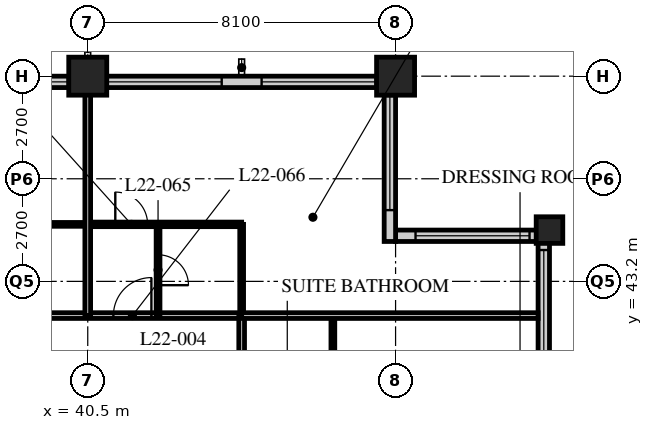
"""IFC4 building model, lengths in metres.
Left out: names, types, materials, properties, quantities, classifications, styles, units other than length and angle.
Written with IfcOpenShell. Run it as: python <this file> out.ifc"""

import sys

from ifc_helpers import new_model, si_unit, direction, frame, frame_2d, origin, origin_2d, place, context, subcontext, project, spatial, rectangle, hollow_rectangle, extrude, element, fill, save


model = new_model("IFC4")
c1 = context("Model", 3, precision=1e-05, world=origin(), true_north=direction((0.0, 1.0)))
c2 = subcontext(c1, "Body", "Model", "MODEL_VIEW")
j1 = project(units=[si_unit("LENGTHUNIT", "METRE"), si_unit("PLANEANGLEUNIT", "RADIAN")], contexts=[c1])
p1 = place(None, origin())
s1 = spatial("IfcSite", under=j1, at=p1, CompositionType="ELEMENT")
p2 = place(p1, origin())
s2 = spatial("IfcBuilding", under=s1, at=p2, CompositionType="ELEMENT")
p3 = place(p2, frame((0.0, 0.0, 87.4)))
s3 = spatial("IfcBuildingStorey", under=s2, at=p3, CompositionType="ELEMENT", Elevation=87.4)
for number, where, z_axis, x_axis in (
    (1, (40.5, 48.6, 0.0), (0.0, 0.0, 1.0), (1.0, 0.0, 0.0)),
    (2, (48.6, 48.6, 0.0), (0.0, 0.0, 1.0), (1.0, 0.0, 0.0)),
):
    element("IfcColumn", number, at=place(p3, frame(where, z_axis=z_axis, x_axis=x_axis)), inside=s3, PredefinedType="COLUMN", context=c2, shape_type="SweptSolid", body=[
        extrude(hollow_rectangle(XDim=1.0, YDim=1.0, WallThickness=0.1, at=origin_2d()), origin(), (0.0, 0.0, 1.0), 3.4),
    ])
p4 = place(p3, frame((52.65, 44.55, 0.0), z_axis=(0.0, 0.0, 1.0), x_axis=(1.0, 0.0, 0.0)))
e3 = element("IfcColumn", 3, at=p4, inside=s3, PredefinedType="COLUMN", context=c2, shape_type="SweptSolid", body=[
    extrude(hollow_rectangle(XDim=0.7, YDim=0.7, WallThickness=0.07, at=origin_2d()), origin(), (0.0, 0.0, 1.0), 3.4),
])
p5 = place(p3, frame((52.5, 40.2, 0.0), z_axis=(0.0, 0.0, 1.0), x_axis=(0.0, 1.0, 0.0)))
e4 = element("IfcWall", 4, at=p5, inside=s3, PredefinedType="SOLIDWALL", context=c2, shape_type="SweptSolid", body=[
    extrude(rectangle(XDim=4.35, YDim=0.3, at=frame_2d((2.175, 0.0))), origin(), (0.0, 0.0, 1.0), 2.45),
])
p6 = place(p5, frame((0.825, 0.0, 0.9)))
e5 = element("IfcOpeningElement", 5, at=p6, cuts=e4, PredefinedType="OPENING", context=c2, shape_type="SweptSolid", body=[
    extrude(rectangle(XDim=3.0, YDim=1.1, at=frame_2d((1.5, 0.55))), frame((0.0, 0.16, 0.0), z_axis=(0.0, -1.0, 0.0), x_axis=(1.0, 0.0, 0.0)), (0.0, 0.0, 1.0), 0.32),
])
p7 = place(p3, frame((52.35, 44.4, 0.0), z_axis=(0.0, 0.0, 1.0), x_axis=(-1.0, 0.0, 0.0)))
e6 = element("IfcWall", 6, at=p7, inside=s3, PredefinedType="SOLIDWALL", context=c2, shape_type="SweptSolid", body=[
    extrude(rectangle(XDim=3.75, YDim=0.3, at=frame_2d((1.875, 0.0))), origin(), (0.0, 0.0, 1.0), 2.45),
])
p8 = place(p7, frame((0.225, 0.0, 0.9)))
e7 = element("IfcOpeningElement", 7, at=p8, cuts=e6, PredefinedType="OPENING", context=c2, shape_type="SweptSolid", body=[
    extrude(rectangle(XDim=3.0, YDim=1.1, at=frame_2d((1.5, 0.55))), frame((0.0, 0.16, 0.0), z_axis=(0.0, -1.0, 0.0), x_axis=(1.0, 0.0, 0.0)), (0.0, 0.0, 1.0), 0.32),
])
p9 = place(p3, frame((48.45, 44.25, 0.0), z_axis=(0.0, 0.0, 1.0), x_axis=(0.0, 1.0, 0.0)))
e8 = element("IfcWall", 8, at=p9, inside=s3, PredefinedType="SOLIDWALL", context=c2, shape_type="SweptSolid", body=[
    extrude(rectangle(XDim=4.35, YDim=0.3, at=frame_2d((2.175, 0.0))), origin(), (0.0, 0.0, 1.0), 2.05),
])
p10 = place(p9, frame((0.825, 0.0, 0.9)))
e9 = element("IfcOpeningElement", 9, at=p10, cuts=e8, PredefinedType="OPENING", context=c2, shape_type="SweptSolid", body=[
    extrude(rectangle(XDim=3.0, YDim=1.1, at=frame_2d((1.5, 0.55))), frame((0.0, 0.16, 0.0), z_axis=(0.0, -1.0, 0.0), x_axis=(1.0, 0.0, 0.0)), (0.0, 0.0, 1.0), 0.32),
])
p11 = place(p3, frame((48.3, 48.45, 0.0), z_axis=(0.0, 0.0, 1.0), x_axis=(-1.0, 0.0, 0.0)))
e10 = element("IfcWall", 10, at=p11, inside=s3, PredefinedType="SOLIDWALL", context=c2, shape_type="SweptSolid", body=[
    extrude(rectangle(XDim=40.2, YDim=0.3, at=frame_2d((20.1, 0.0))), origin(), (0.0, 0.0, 1.0), 2.05),
])
p12 = place(p11, frame((0.225, 0.0, 0.9)))
e11 = element("IfcOpeningElement", 11, at=p12, cuts=e10, PredefinedType="OPENING", context=c2, shape_type="SweptSolid", body=[
    extrude(rectangle(XDim=3.0, YDim=1.1, at=frame_2d((1.5, 0.55))), frame((0.0, 0.16, 0.0), z_axis=(0.0, -1.0, 0.0), x_axis=(1.0, 0.0, 0.0)), (0.0, 0.0, 1.0), 0.32),
])
p13 = place(p11, frame((4.275, 0.0, 0.9)))
e12 = element("IfcOpeningElement", 12, at=p13, cuts=e10, PredefinedType="OPENING", context=c2, shape_type="SweptSolid", body=[
    extrude(rectangle(XDim=3.0, YDim=1.1, at=frame_2d((1.5, 0.55))), frame((0.0, 0.16, 0.0), z_axis=(0.0, -1.0, 0.0), x_axis=(1.0, 0.0, 0.0)), (0.0, 0.0, 1.0), 0.32),
])
p14 = place(p11, frame((8.325, 0.0, 0.9)))
e13 = element("IfcOpeningElement", 13, at=p14, cuts=e10, PredefinedType="OPENING", context=c2, shape_type="SweptSolid", body=[
    extrude(rectangle(XDim=3.0, YDim=1.1, at=frame_2d((1.5, 0.55))), frame((0.0, 0.16, 0.0), z_axis=(0.0, -1.0, 0.0), x_axis=(1.0, 0.0, 0.0)), (0.0, 0.0, 1.0), 0.32),
])
p15 = place(p11, frame((12.375, 0.0, 0.9)))
e14 = element("IfcOpeningElement", 14, at=p15, cuts=e10, PredefinedType="OPENING", context=c2, shape_type="SweptSolid", body=[
    extrude(rectangle(XDim=3.0, YDim=1.1, at=frame_2d((1.5, 0.55))), frame((0.0, 0.16, 0.0), z_axis=(0.0, -1.0, 0.0), x_axis=(1.0, 0.0, 0.0)), (0.0, 0.0, 1.0), 0.32),
])
p16 = place(p11, frame((16.425, 0.0, 0.9)))
e15 = element("IfcOpeningElement", 15, at=p16, cuts=e10, PredefinedType="OPENING", context=c2, shape_type="SweptSolid", body=[
    extrude(rectangle(XDim=3.0, YDim=1.1, at=frame_2d((1.5, 0.55))), frame((0.0, 0.16, 0.0), z_axis=(0.0, -1.0, 0.0), x_axis=(1.0, 0.0, 0.0)), (0.0, 0.0, 1.0), 0.32),
])
p17 = place(p11, frame((20.475, 0.0, 0.9)))
e16 = element("IfcOpeningElement", 16, at=p17, cuts=e10, PredefinedType="OPENING", context=c2, shape_type="SweptSolid", body=[
    extrude(rectangle(XDim=3.0, YDim=1.1, at=frame_2d((1.5, 0.55))), frame((0.0, 0.16, 0.0), z_axis=(0.0, -1.0, 0.0), x_axis=(1.0, 0.0, 0.0)), (0.0, 0.0, 1.0), 0.32),
])
p18 = place(p11, frame((24.525, 0.0, 0.9)))
e17 = element("IfcOpeningElement", 17, at=p18, cuts=e10, PredefinedType="OPENING", context=c2, shape_type="SweptSolid", body=[
    extrude(rectangle(XDim=3.0, YDim=1.1, at=frame_2d((1.5, 0.55))), frame((0.0, 0.16, 0.0), z_axis=(0.0, -1.0, 0.0), x_axis=(1.0, 0.0, 0.0)), (0.0, 0.0, 1.0), 0.32),
])
p19 = place(p11, frame((28.575, 0.0, 0.9)))
e18 = element("IfcOpeningElement", 18, at=p19, cuts=e10, PredefinedType="OPENING", context=c2, shape_type="SweptSolid", body=[
    extrude(rectangle(XDim=3.0, YDim=1.1, at=frame_2d((1.5, 0.55))), frame((0.0, 0.16, 0.0), z_axis=(0.0, -1.0, 0.0), x_axis=(1.0, 0.0, 0.0)), (0.0, 0.0, 1.0), 0.32),
])
p20 = place(p11, frame((32.625, 0.0, 0.9)))
e19 = element("IfcOpeningElement", 19, at=p20, cuts=e10, PredefinedType="OPENING", context=c2, shape_type="SweptSolid", body=[
    extrude(rectangle(XDim=3.0, YDim=1.1, at=frame_2d((1.5, 0.55))), frame((0.0, 0.16, 0.0), z_axis=(0.0, -1.0, 0.0), x_axis=(1.0, 0.0, 0.0)), (0.0, 0.0, 1.0), 0.32),
])
p21 = place(p11, frame((36.675, 0.0, 0.9)))
e20 = element("IfcOpeningElement", 20, at=p21, cuts=e10, PredefinedType="OPENING", context=c2, shape_type="SweptSolid", body=[
    extrude(rectangle(XDim=3.0, YDim=1.1, at=frame_2d((1.5, 0.55))), frame((0.0, 0.16, 0.0), z_axis=(0.0, -1.0, 0.0), x_axis=(1.0, 0.0, 0.0)), (0.0, 0.0, 1.0), 0.32),
])
p22 = place(p3, frame((12.15, 42.3, 0.0), z_axis=(0.0, 0.0, 1.0), x_axis=(1.0, 0.0, 0.0)))
e21 = element("IfcWall", 21, at=p22, inside=s3, PredefinedType="PARTITIONING", context=c2, shape_type="SweptSolid", body=[
    extrude(rectangle(XDim=32.4, YDim=0.15, at=frame_2d((16.2, 0.0))), origin(), (0.0, 0.0, 1.0), 3.15),
])
p23 = place(p22, frame((5.95, 0.0, 0.0)))
e22 = element("IfcOpeningElement", 22, at=p23, cuts=e21, PredefinedType="OPENING", context=c2, shape_type="SweptSolid", body=[
    extrude(rectangle(XDim=1.0, YDim=2.1, at=frame_2d((0.5, 1.05))), frame((0.0, 0.085, 0.0), z_axis=(0.0, -1.0, 0.0), x_axis=(1.0, 0.0, 0.0)), (0.0, 0.0, 1.0), 0.17),
])
p24 = place(p22, frame((14.6, 0.0, 0.0)))
e23 = element("IfcOpeningElement", 23, at=p24, cuts=e21, PredefinedType="OPENING", context=c2, shape_type="SweptSolid", body=[
    extrude(rectangle(XDim=1.0, YDim=2.1, at=frame_2d((0.5, 1.05))), frame((0.0, 0.085, 0.0), z_axis=(0.0, -1.0, 0.0), x_axis=(1.0, 0.0, 0.0)), (0.0, 0.0, 1.0), 0.17),
])
p25 = place(p22, frame((18.65, 0.0, 0.0)))
e24 = element("IfcOpeningElement", 24, at=p25, cuts=e21, PredefinedType="OPENING", context=c2, shape_type="SweptSolid", body=[
    extrude(rectangle(XDim=1.0, YDim=2.1, at=frame_2d((0.5, 1.05))), frame((0.0, 0.085, 0.0), z_axis=(0.0, -1.0, 0.0), x_axis=(1.0, 0.0, 0.0)), (0.0, 0.0, 1.0), 0.17),
])
p26 = place(p22, frame((22.15, 0.0, 0.0)))
e25 = element("IfcOpeningElement", 25, at=p26, cuts=e21, PredefinedType="OPENING", context=c2, shape_type="SweptSolid", body=[
    extrude(rectangle(XDim=1.0, YDim=2.1, at=frame_2d((0.5, 1.05))), frame((0.0, 0.085, 0.0), z_axis=(0.0, -1.0, 0.0), x_axis=(1.0, 0.0, 0.0)), (0.0, 0.0, 1.0), 0.17),
])
p27 = place(p22, frame((29.025, 0.0, 0.0)))
e26 = element("IfcOpeningElement", 26, at=p27, cuts=e21, PredefinedType="OPENING", context=c2, shape_type="SweptSolid", body=[
    extrude(rectangle(XDim=1.0, YDim=2.1, at=frame_2d((0.5, 1.05))), frame((0.0, 0.085, 0.0), z_axis=(0.0, -1.0, 0.0), x_axis=(1.0, 0.0, 0.0)), (0.0, 0.0, 1.0), 0.17),
])
p28 = place(p22, frame((2.375, 0.0, 0.0)))
e27 = element("IfcOpeningElement", 27, at=p28, cuts=e21, PredefinedType="OPENING", context=c2, shape_type="SweptSolid", body=[
    extrude(rectangle(XDim=1.0, YDim=2.1, at=frame_2d((0.5, 1.05))), frame((0.0, 0.085, 0.0), z_axis=(0.0, -1.0, 0.0), x_axis=(1.0, 0.0, 0.0)), (0.0, 0.0, 1.0), 0.17),
])
p29 = place(p3, frame((44.55, 16.2, 0.0), z_axis=(0.0, 0.0, 1.0), x_axis=(0.0, 1.0, 0.0)))
e28 = element("IfcWall", 28, at=p29, inside=s3, PredefinedType="PARTITIONING", context=c2, shape_type="SweptSolid", body=[
    extrude(rectangle(XDim=26.1, YDim=0.15, at=frame_2d((13.05, 0.0))), origin(), (0.0, 0.0, 1.0), 3.15),
])
p30 = place(p29, frame((2.75, 0.0, 0.0)))
e29 = element("IfcOpeningElement", 29, at=p30, cuts=e28, PredefinedType="OPENING", context=c2, shape_type="SweptSolid", body=[
    extrude(rectangle(XDim=1.0, YDim=2.1, at=frame_2d((0.5, 1.05))), frame((0.0, 0.085, 0.0), z_axis=(0.0, -1.0, 0.0), x_axis=(1.0, 0.0, 0.0)), (0.0, 0.0, 1.0), 0.17),
])
p31 = place(p29, frame((6.5, 0.0, 0.0)))
e30 = element("IfcOpeningElement", 30, at=p31, cuts=e28, PredefinedType="OPENING", context=c2, shape_type="SweptSolid", body=[
    extrude(rectangle(XDim=1.0, YDim=2.1, at=frame_2d((0.5, 1.05))), frame((0.0, 0.085, 0.0), z_axis=(0.0, -1.0, 0.0), x_axis=(1.0, 0.0, 0.0)), (0.0, 0.0, 1.0), 0.17),
])
p32 = place(p29, frame((10.0, 0.0, 0.0)))
e31 = element("IfcOpeningElement", 31, at=p32, cuts=e28, PredefinedType="OPENING", context=c2, shape_type="SweptSolid", body=[
    extrude(rectangle(XDim=1.0, YDim=2.1, at=frame_2d((0.5, 1.05))), frame((0.0, 0.085, 0.0), z_axis=(0.0, -1.0, 0.0), x_axis=(1.0, 0.0, 0.0)), (0.0, 0.0, 1.0), 0.17),
])
p33 = place(p29, frame((18.1, 0.0, 0.0)))
e32 = element("IfcOpeningElement", 32, at=p33, cuts=e28, PredefinedType="OPENING", context=c2, shape_type="SweptSolid", body=[
    extrude(rectangle(XDim=1.0, YDim=2.1, at=frame_2d((0.5, 1.05))), frame((0.0, 0.085, 0.0), z_axis=(0.0, -1.0, 0.0), x_axis=(1.0, 0.0, 0.0)), (0.0, 0.0, 1.0), 0.17),
])
for number, where, z_axis, x_axis in (
    (33, (37.9, 44.7, 0.0), (0.0, 0.0, 1.0), (1.0, 0.0, 0.0)),
    (34, (46.95, 39.7, 0.0), (0.0, 0.0, 1.0), (0.0, 1.0, 0.0)),
):
    element("IfcWall", number, at=place(p3, frame(where, z_axis=z_axis, x_axis=x_axis)), inside=s3, PredefinedType="PARTITIONING", context=c2, shape_type="SweptSolid", body=[
        extrude(rectangle(XDim=2.6, YDim=0.1, at=frame_2d((1.3, 0.0))), origin(), (0.0, 0.0, 1.0), 3.15),
    ])
p34 = place(p3, frame((40.5, 44.7, 0.0), z_axis=(0.0, 0.0, 1.0), x_axis=(1.0, 0.0, 0.0)))
e35 = element("IfcWall", 35, at=p34, inside=s3, PredefinedType="PARTITIONING", context=c2, shape_type="SweptSolid", body=[
    extrude(rectangle(XDim=4.05, YDim=0.12, at=frame_2d((2.025, 0.0))), origin(), (0.0, 0.0, 1.0), 3.15),
])
p35 = place(p34, frame((0.725, 0.0, 0.0)))
e36 = element("IfcOpeningElement", 36, at=p35, cuts=e35, PredefinedType="OPENING", context=c2, shape_type="SweptSolid", body=[
    extrude(rectangle(XDim=0.85, YDim=2.1, at=frame_2d((0.425, 1.05))), frame((0.0, 0.07, 0.0), z_axis=(0.0, -1.0, 0.0), x_axis=(1.0, 0.0, 0.0)), (0.0, 0.0, 1.0), 0.14),
])
p36 = place(p3, frame((42.35, 42.3, 0.0), z_axis=(0.0, 0.0, 1.0), x_axis=(0.0, 1.0, 0.0)))
e37 = element("IfcWall", 37, at=p36, inside=s3, PredefinedType="PARTITIONING", context=c2, shape_type="SweptSolid", body=[
    extrude(rectangle(XDim=2.4, YDim=0.1, at=frame_2d((1.2, 0.0))), origin(), (0.0, 0.0, 1.0), 3.15),
])
p37 = place(p36, frame((0.8, 0.0, 0.0)))
e38 = element("IfcOpeningElement", 38, at=p37, cuts=e37, PredefinedType="OPENING", context=c2, shape_type="SweptSolid", body=[
    extrude(rectangle(XDim=0.8, YDim=2.1, at=frame_2d((0.4, 1.05))), frame((0.0, 0.06, 0.0), z_axis=(0.0, -1.0, 0.0), x_axis=(1.0, 0.0, 0.0)), (0.0, 0.0, 1.0), 0.12),
])
p38 = place(p3, frame((44.55, 42.3, 0.0), z_axis=(0.0, 0.0, 1.0), x_axis=(0.0, 1.0, 0.0)))
e39 = element("IfcWall", 39, at=p38, inside=s3, PredefinedType="PARTITIONING", context=c2, shape_type="SweptSolid", body=[
    extrude(rectangle(XDim=2.4, YDim=0.1, at=frame_2d((1.2, 0.0))), origin(), (0.0, 0.0, 1.0), 3.15),
])
p39 = place(p3, frame((44.55, 42.3, 0.0), z_axis=(0.0, 0.0, 1.0), x_axis=(1.0, 0.0, 0.0)))
e40 = element("IfcWall", 40, at=p39, inside=s3, PredefinedType="PARTITIONING", context=c2, shape_type="SweptSolid", body=[
    extrude(rectangle(XDim=7.8, YDim=0.15, at=frame_2d((3.9, 0.0))), origin(), (0.0, 0.0, 1.0), 3.15),
])
p40 = place(p3, frame((40.5, 42.3, 0.0), z_axis=(0.0, 0.0, 1.0), x_axis=(0.0, 1.0, 0.0)))
e41 = element("IfcWall", 41, at=p40, inside=s3, PredefinedType="PARTITIONING", context=c2, shape_type="SweptSolid", body=[
    extrude(rectangle(XDim=6.0, YDim=0.15, at=frame_2d((3.0, 0.0))), origin(), (0.0, 0.0, 1.0), 2.05),
])
p41 = place(p6, origin())
e42 = element("IfcWindow", 42, at=p41, inside=s3, PartitioningType="SINGLE_PANEL", PredefinedType="WINDOW", context=c2, shape_type="SweptSolid", body=[
    extrude(rectangle(XDim=3.0, YDim=1.1, at=frame_2d((1.5, 0.55))), frame((0.0, 0.03, 0.0), z_axis=(0.0, -1.0, 0.0), x_axis=(1.0, 0.0, 0.0)), (0.0, 0.0, 1.0), 0.06),
])
fill(e5, e42)
p42 = place(p8, origin())
e43 = element("IfcWindow", 43, at=p42, inside=s3, PartitioningType="SINGLE_PANEL", PredefinedType="WINDOW", context=c2, shape_type="SweptSolid", body=[
    extrude(rectangle(XDim=3.0, YDim=1.1, at=frame_2d((1.5, 0.55))), frame((0.0, 0.03, 0.0), z_axis=(0.0, -1.0, 0.0), x_axis=(1.0, 0.0, 0.0)), (0.0, 0.0, 1.0), 0.06),
])
fill(e7, e43)
p43 = place(p10, origin())
e44 = element("IfcWindow", 44, at=p43, inside=s3, PartitioningType="SINGLE_PANEL", PredefinedType="WINDOW", context=c2, shape_type="SweptSolid", body=[
    extrude(rectangle(XDim=3.0, YDim=1.1, at=frame_2d((1.5, 0.55))), frame((0.0, 0.03, 0.0), z_axis=(0.0, -1.0, 0.0), x_axis=(1.0, 0.0, 0.0)), (0.0, 0.0, 1.0), 0.06),
])
fill(e9, e44)
p44 = place(p12, origin())
e45 = element("IfcWindow", 45, at=p44, inside=s3, PartitioningType="SINGLE_PANEL", PredefinedType="WINDOW", context=c2, shape_type="SweptSolid", body=[
    extrude(rectangle(XDim=3.0, YDim=1.1, at=frame_2d((1.5, 0.55))), frame((0.0, 0.03, 0.0), z_axis=(0.0, -1.0, 0.0), x_axis=(1.0, 0.0, 0.0)), (0.0, 0.0, 1.0), 0.06),
])
fill(e11, e45)
p45 = place(p13, origin())
e46 = element("IfcWindow", 46, at=p45, inside=s3, PartitioningType="SINGLE_PANEL", PredefinedType="WINDOW", context=c2, shape_type="SweptSolid", body=[
    extrude(rectangle(XDim=3.0, YDim=1.1, at=frame_2d((1.5, 0.55))), frame((0.0, 0.03, 0.0), z_axis=(0.0, -1.0, 0.0), x_axis=(1.0, 0.0, 0.0)), (0.0, 0.0, 1.0), 0.06),
])
fill(e12, e46)
p46 = place(p14, origin())
e47 = element("IfcWindow", 47, at=p46, inside=s3, PartitioningType="SINGLE_PANEL", PredefinedType="WINDOW", context=c2, shape_type="SweptSolid", body=[
    extrude(rectangle(XDim=3.0, YDim=1.1, at=frame_2d((1.5, 0.55))), frame((0.0, 0.03, 0.0), z_axis=(0.0, -1.0, 0.0), x_axis=(1.0, 0.0, 0.0)), (0.0, 0.0, 1.0), 0.06),
])
fill(e13, e47)
p47 = place(p37, origin())
e48 = element("IfcDoor", 48, at=p47, inside=s3, OperationType="SINGLE_SWING_RIGHT", PredefinedType="DOOR", context=c2, shape_type="SweptSolid", body=[
    extrude(rectangle(XDim=0.8, YDim=2.1, at=frame_2d((0.4, 1.05))), frame((0.0, 0.025, 0.0), z_axis=(0.0, -1.0, 0.0), x_axis=(1.0, 0.0, 0.0)), (0.0, 0.0, 1.0), 0.05),
])
fill(e38, e48)
p48 = place(p27, origin())
e49 = element("IfcDoor", 49, at=p48, inside=s3, OperationType="SINGLE_SWING_RIGHT", PredefinedType="DOOR", context=c2, shape_type="SweptSolid", body=[
    extrude(rectangle(XDim=1.0, YDim=2.1, at=frame_2d((0.5, 1.05))), frame((0.0, 0.025, 0.0), z_axis=(0.0, -1.0, 0.0), x_axis=(1.0, 0.0, 0.0)), (0.0, 0.0, 1.0), 0.05),
])
fill(e26, e49)
p49 = place(p35, origin())
e50 = element("IfcDoor", 50, at=p49, inside=s3, OperationType="SINGLE_SWING_LEFT", PredefinedType="DOOR", context=c2, shape_type="SweptSolid", body=[
    extrude(rectangle(XDim=0.85, YDim=2.1, at=frame_2d((0.425, 1.05))), frame((0.0, 0.025, 0.0), z_axis=(0.0, -1.0, 0.0), x_axis=(1.0, 0.0, 0.0)), (0.0, 0.0, 1.0), 0.05),
])
fill(e36, e50)
save(model, sys.argv[1])
